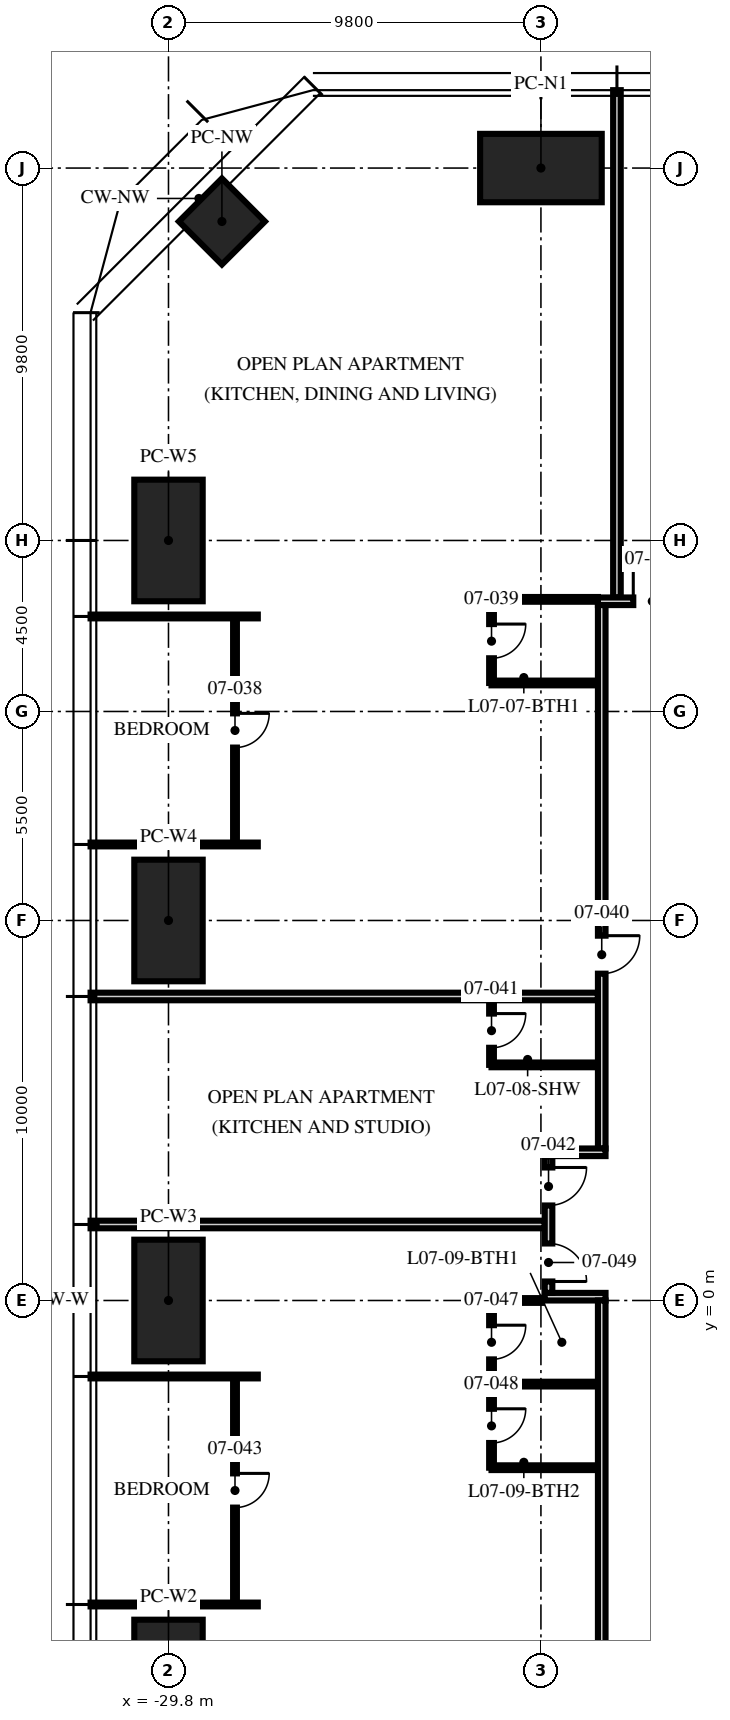
"""IFC4 building model, lengths in metres.
Left out: names, types, materials, properties, quantities, classifications, styles, units other than length and angle.
Written with IfcOpenShell. Run it as: python <this file> out.ifc"""

import sys

from ifc_helpers import new_model, si_unit, direction, frame, frame_2d, origin, origin_2d, place, context, subcontext, project, spatial, rectangle, hollow_rectangle, extrude, element, fill, save


model = new_model("IFC4")
c1 = context("Model", 3, precision=1e-05, world=origin(), true_north=direction((0.0, 1.0)))
c2 = subcontext(c1, "Body", "Model", "MODEL_VIEW")
j1 = project(units=[si_unit("LENGTHUNIT", "METRE"), si_unit("PLANEANGLEUNIT", "RADIAN")], contexts=[c1])
p1 = place(None, origin())
s1 = spatial("IfcSite", under=j1, at=p1, CompositionType="ELEMENT")
p2 = place(p1, origin())
s2 = spatial("IfcBuilding", under=s1, at=p2, CompositionType="ELEMENT")
p3 = place(p2, frame((0.0, 0.0, 32.25)))
s3 = spatial("IfcBuildingStorey", under=s2, at=p3, CompositionType="ELEMENT", Elevation=32.25)
for number, where, z_axis, x_axis in (
    (1, (-20.0, 29.8, 0.0), (0.0, 0.0, 1.0), (1.0, 0.0, 0.0)),
    (2, (-29.8, -10.0, 0.0), (0.0, 0.0, 1.0), (0.0, 1.0, 0.0)),
    (3, (-29.8, 0.0, 0.0), (0.0, 0.0, 1.0), (0.0, 1.0, 0.0)),
    (4, (-29.8, 10.0, 0.0), (0.0, 0.0, 1.0), (0.0, 1.0, 0.0)),
    (5, (-29.8, 20.0, 0.0), (0.0, 0.0, 1.0), (0.0, 1.0, 0.0)),
):
    element("IfcColumn", number, at=place(p3, frame(where, z_axis=z_axis, x_axis=x_axis)), inside=s3, PredefinedType="COLUMN", context=c2, shape_type="SweptSolid", body=[
        extrude(hollow_rectangle(XDim=3.2, YDim=1.8, WallThickness=0.2, at=origin_2d()), origin(), (0.0, 0.0, 1.0), 3.75),
    ])
p4 = place(p3, frame((-28.394, 28.394, 0.0), z_axis=(0.0, 0.0, 1.0), x_axis=(0.707106781187, 0.707106781187, 0.0)))
e6 = element("IfcColumn", 6, at=p4, inside=s3, PredefinedType="COLUMN", context=c2, shape_type="SweptSolid", body=[
    extrude(hollow_rectangle(XDim=1.6, YDim=1.6, WallThickness=0.1, at=origin_2d()), origin(), (0.0, 0.0, 1.0), 3.75),
])
p5 = place(p3, frame((-18.0, 18.5, 0.0), z_axis=(0.0, 0.0, 1.0), x_axis=(0.0, 1.0, 0.0)))
e7 = element("IfcWall", 7, at=p5, inside=s3, PredefinedType="PARTITIONING", context=c2, shape_type="SweptSolid", body=[
    extrude(rectangle(XDim=13.35, YDim=0.2, at=frame_2d((6.675, 0.0))), origin(), (0.0, 0.0, 1.0), 2.3),
])
for number, where, z_axis, x_axis in (
    (8, (-27.45, 18.0, 0.0), (0.0, 0.0, 1.0), (-1.0, 0.0, 0.0)),
    (9, (-27.45, 12.0, 0.0), (0.0, 0.0, 1.0), (-1.0, 0.0, 0.0)),
):
    element("IfcWall", number, at=place(p3, frame(where, z_axis=z_axis, x_axis=x_axis)), inside=s3, PredefinedType="PARTITIONING", context=c2, shape_type="SweptSolid", body=[
        extrude(rectangle(XDim=4.4, YDim=0.1, at=frame_2d((2.2, 0.0))), origin(), (0.0, 0.0, 1.0), 2.71),
    ])
p6 = place(p3, frame((-18.5, 8.0, 0.0), z_axis=(0.0, 0.0, 1.0), x_axis=(-1.0, 0.0, 0.0)))
e10 = element("IfcWall", 10, at=p6, inside=s3, PredefinedType="PARTITIONING", context=c2, shape_type="SweptSolid", body=[
    extrude(rectangle(XDim=13.35, YDim=0.2, at=frame_2d((6.675, 0.0))), origin(), (0.0, 0.0, 1.0), 2.71),
])
p7 = place(p3, frame((-19.9, 2.0, 0.0), z_axis=(0.0, 0.0, 1.0), x_axis=(-1.0, 0.0, 0.0)))
e11 = element("IfcWall", 11, at=p7, inside=s3, PredefinedType="PARTITIONING", context=c2, shape_type="SweptSolid", body=[
    extrude(rectangle(XDim=11.95, YDim=0.2, at=frame_2d((5.975, 0.0))), origin(), (0.0, 0.0, 1.0), 2.71),
])
for number, where, z_axis, x_axis in (
    (12, (-27.45, -2.0, 0.0), (0.0, 0.0, 1.0), (-1.0, 0.0, 0.0)),
    (13, (-27.45, -8.0, 0.0), (0.0, 0.0, 1.0), (-1.0, 0.0, 0.0)),
):
    element("IfcWall", number, at=place(p3, frame(where, z_axis=z_axis, x_axis=x_axis)), inside=s3, PredefinedType="PARTITIONING", context=c2, shape_type="SweptSolid", body=[
        extrude(rectangle(XDim=4.4, YDim=0.1, at=frame_2d((2.2, 0.0))), origin(), (0.0, 0.0, 1.0), 2.71),
    ])
p8 = place(p3, frame((-28.05, 18.0, 0.0), z_axis=(0.0, 0.0, 1.0), x_axis=(0.0, -1.0, 0.0)))
e14 = element("IfcWall", 14, at=p8, inside=s3, PredefinedType="PARTITIONING", context=c2, shape_type="SweptSolid", body=[
    extrude(rectangle(XDim=6.0, YDim=0.1, at=frame_2d((3.0, 0.0))), origin(), (0.0, 0.0, 1.0), 2.61),
])
p9 = place(p8, frame((2.55, 0.0, 0.0)))
e15 = element("IfcOpeningElement", 15, at=p9, cuts=e14, PredefinedType="OPENING", context=c2, shape_type="SweptSolid", body=[
    extrude(rectangle(XDim=0.9, YDim=2.1, at=frame_2d((0.45, 1.05))), frame((0.0, 0.06, 0.0), z_axis=(0.0, -1.0, 0.0), x_axis=(1.0, 0.0, 0.0)), (0.0, 0.0, 1.0), 0.12),
])
p10 = place(p3, frame((-21.3, 18.45, 0.0), z_axis=(0.0, 0.0, 1.0), x_axis=(0.0, -1.0, 0.0)))
e16 = element("IfcWall", 16, at=p10, inside=s3, PredefinedType="PARTITIONING", context=c2, shape_type="SweptSolid", body=[
    extrude(rectangle(XDim=2.2, YDim=0.125, at=frame_2d((1.1, 0.0))), origin(), (0.0, 0.0, 1.0), 3.5),
])
p11 = place(p10, frame((0.65, 0.0, 0.0)))
e17 = element("IfcOpeningElement", 17, at=p11, cuts=e16, PredefinedType="OPENING", context=c2, shape_type="SweptSolid", body=[
    extrude(rectangle(XDim=0.9, YDim=2.1, at=frame_2d((0.45, 1.05))), frame((0.0, 0.073, 0.0), z_axis=(0.0, -1.0, 0.0), x_axis=(1.0, 0.0, 0.0)), (0.0, 0.0, 1.0), 0.145),
])
p12 = place(p3, frame((-18.5, 18.45, 0.0), z_axis=(0.0, 0.0, 1.0), x_axis=(-1.0, 0.0, 0.0)))
e18 = element("IfcWall", 18, at=p12, inside=s3, PredefinedType="PARTITIONING", context=c2, shape_type="SweptSolid", body=[
    extrude(rectangle(XDim=2.8, YDim=0.125, at=frame_2d((1.4, 0.0))), origin(), (0.0, 0.0, 1.0), 2.3),
])
p13 = place(p3, frame((-18.5, 16.25, 0.0), z_axis=(0.0, 0.0, 1.0), x_axis=(-1.0, 0.0, 0.0)))
e19 = element("IfcWall", 19, at=p13, inside=s3, PredefinedType="PARTITIONING", context=c2, shape_type="SweptSolid", body=[
    extrude(rectangle(XDim=2.8, YDim=0.125, at=frame_2d((1.4, 0.0))), origin(), (0.0, 0.0, 1.0), 3.5),
])
p14 = place(p3, frame((-21.3, 8.0, 0.0), z_axis=(0.0, 0.0, 1.0), x_axis=(0.0, -1.0, 0.0)))
e20 = element("IfcWall", 20, at=p14, inside=s3, PredefinedType="PARTITIONING", context=c2, shape_type="SweptSolid", body=[
    extrude(rectangle(XDim=1.8, YDim=0.125, at=frame_2d((0.9, 0.0))), origin(), (0.0, 0.0, 1.0), 3.5),
])
p15 = place(p14, frame((0.45, 0.0, 0.0)))
e21 = element("IfcOpeningElement", 21, at=p15, cuts=e20, PredefinedType="OPENING", context=c2, shape_type="SweptSolid", body=[
    extrude(rectangle(XDim=0.9, YDim=2.1, at=frame_2d((0.45, 1.05))), frame((0.0, 0.073, 0.0), z_axis=(0.0, -1.0, 0.0), x_axis=(1.0, 0.0, 0.0)), (0.0, 0.0, 1.0), 0.145),
])
p16 = place(p3, frame((-18.5, 6.2, 0.0), z_axis=(0.0, 0.0, 1.0), x_axis=(-1.0, 0.0, 0.0)))
e22 = element("IfcWall", 22, at=p16, inside=s3, PredefinedType="PARTITIONING", context=c2, shape_type="SweptSolid", body=[
    extrude(rectangle(XDim=2.8, YDim=0.125, at=frame_2d((1.4, 0.0))), origin(), (0.0, 0.0, 1.0), 3.5),
])
p17 = place(p3, frame((-28.05, -2.0, 0.0), z_axis=(0.0, 0.0, 1.0), x_axis=(0.0, -1.0, 0.0)))
e23 = element("IfcWall", 23, at=p17, inside=s3, PredefinedType="PARTITIONING", context=c2, shape_type="SweptSolid", body=[
    extrude(rectangle(XDim=6.0, YDim=0.1, at=frame_2d((3.0, 0.0))), origin(), (0.0, 0.0, 1.0), 2.61),
])
p18 = place(p17, frame((2.55, 0.0, 0.0)))
e24 = element("IfcOpeningElement", 24, at=p18, cuts=e23, PredefinedType="OPENING", context=c2, shape_type="SweptSolid", body=[
    extrude(rectangle(XDim=0.9, YDim=2.1, at=frame_2d((0.45, 1.05))), frame((0.0, 0.06, 0.0), z_axis=(0.0, -1.0, 0.0), x_axis=(1.0, 0.0, 0.0)), (0.0, 0.0, 1.0), 0.12),
])
p19 = place(p3, frame((-21.3, 0.0, 0.0), z_axis=(0.0, 0.0, 1.0), x_axis=(0.0, -1.0, 0.0)))
e25 = element("IfcWall", 25, at=p19, inside=s3, PredefinedType="PARTITIONING", context=c2, shape_type="SweptSolid", body=[
    extrude(rectangle(XDim=4.4, YDim=0.125, at=frame_2d((2.2, 0.0))), origin(), (0.0, 0.0, 1.0), 2.492),
])
p20 = place(p19, frame((0.65, 0.0, 0.0)))
e26 = element("IfcOpeningElement", 26, at=p20, cuts=e25, PredefinedType="OPENING", context=c2, shape_type="SweptSolid", body=[
    extrude(rectangle(XDim=0.9, YDim=2.1, at=frame_2d((0.45, 1.05))), frame((0.0, 0.073, 0.0), z_axis=(0.0, -1.0, 0.0), x_axis=(1.0, 0.0, 0.0)), (0.0, 0.0, 1.0), 0.145),
])
p21 = place(p19, frame((2.85, 0.0, 0.0)))
e27 = element("IfcOpeningElement", 27, at=p21, cuts=e25, PredefinedType="OPENING", context=c2, shape_type="SweptSolid", body=[
    extrude(rectangle(XDim=0.9, YDim=2.1, at=frame_2d((0.45, 1.05))), frame((0.0, 0.073, 0.0), z_axis=(0.0, -1.0, 0.0), x_axis=(1.0, 0.0, 0.0)), (0.0, 0.0, 1.0), 0.145),
])
p22 = place(p3, frame((-19.97, 0.0, 0.0), z_axis=(0.0, 0.0, 1.0), x_axis=(-1.0, 0.0, 0.0)))
e28 = element("IfcWall", 28, at=p22, inside=s3, PredefinedType="PARTITIONING", context=c2, shape_type="SweptSolid", body=[
    extrude(rectangle(XDim=1.33, YDim=0.125, at=frame_2d((0.665, 0.0))), origin(), (0.0, 0.0, 1.0), 2.492),
])
for number, where, z_axis, x_axis in (
    (29, (-18.5, -2.2, 0.0), (0.0, 0.0, 1.0), (-1.0, 0.0, 0.0)),
    (30, (-18.5, -4.4, 0.0), (0.0, 0.0, 1.0), (-1.0, 0.0, 0.0)),
):
    element("IfcWall", number, at=place(p3, frame(where, z_axis=z_axis, x_axis=x_axis)), inside=s3, PredefinedType="PARTITIONING", context=c2, shape_type="SweptSolid", body=[
        extrude(rectangle(XDim=2.8, YDim=0.125, at=frame_2d((1.4, 0.0))), origin(), (0.0, 0.0, 1.0), 3.5),
    ])
p23 = place(p3, frame((-18.5, 18.4, 0.0), z_axis=(0.0, 0.0, 1.0), x_axis=(1.0, 0.0, 0.0)))
e31 = element("IfcWall", 31, at=p23, inside=s3, PredefinedType="PARTITIONING", context=c2, shape_type="SweptSolid", body=[
    extrude(rectangle(XDim=37.0, YDim=0.2, at=frame_2d((18.5, 0.0))), origin(), (0.0, 0.0, 1.0), 2.3),
])
p24 = place(p23, frame((27.1, 0.0, 0.0)))
e32 = element("IfcOpeningElement", 32, at=p24, cuts=e31, PredefinedType="OPENING", context=c2, shape_type="SweptSolid", body=[
    extrude(rectangle(XDim=1.0, YDim=2.2, at=frame_2d((0.5, 1.1))), frame((0.0, 0.11, 0.0), z_axis=(0.0, -1.0, 0.0), x_axis=(1.0, 0.0, 0.0)), (0.0, 0.0, 1.0), 0.22),
])
p25 = place(p23, frame((11.23, 0.0, 0.0)))
e33 = element("IfcOpeningElement", 33, at=p25, cuts=e31, PredefinedType="OPENING", context=c2, shape_type="SweptSolid", body=[
    extrude(rectangle(XDim=1.0, YDim=2.2, at=frame_2d((0.5, 1.1))), frame((0.0, 0.11, 0.0), z_axis=(0.0, -1.0, 0.0), x_axis=(1.0, 0.0, 0.0)), (0.0, 0.0, 1.0), 0.22),
])
p26 = place(p23, frame((6.93, 0.0, 0.0)))
e34 = element("IfcOpeningElement", 34, at=p26, cuts=e31, PredefinedType="OPENING", context=c2, shape_type="SweptSolid", body=[
    extrude(rectangle(XDim=1.0, YDim=2.2, at=frame_2d((0.5, 1.1))), frame((0.0, 0.11, 0.0), z_axis=(0.0, -1.0, 0.0), x_axis=(1.0, 0.0, 0.0)), (0.0, 0.0, 1.0), 0.22),
])
p27 = place(p23, frame((0.93, 0.0, 0.0)))
e35 = element("IfcOpeningElement", 35, at=p27, cuts=e31, PredefinedType="OPENING", context=c2, shape_type="SweptSolid", body=[
    extrude(rectangle(XDim=1.0, YDim=2.2, at=frame_2d((0.5, 1.1))), frame((0.0, 0.11, 0.0), z_axis=(0.0, -1.0, 0.0), x_axis=(1.0, 0.0, 0.0)), (0.0, 0.0, 1.0), 0.22),
])
p28 = place(p3, frame((-18.4, 18.3, 0.0), z_axis=(0.0, 0.0, 1.0), x_axis=(0.0, -1.0, 0.0)))
e36 = element("IfcWall", 36, at=p28, inside=s3, PredefinedType="PARTITIONING", context=c2, shape_type="SweptSolid", body=[
    extrude(rectangle(XDim=14.3, YDim=0.2, at=frame_2d((7.15, 0.0))), origin(), (0.0, 0.0, 1.0), 2.3),
])
p29 = place(p28, frame((8.7, 0.0, 0.0)))
e37 = element("IfcOpeningElement", 37, at=p29, cuts=e36, PredefinedType="OPENING", context=c2, shape_type="SweptSolid", body=[
    extrude(rectangle(XDim=1.0, YDim=2.2, at=frame_2d((0.5, 1.1))), frame((0.0, 0.11, 0.0), z_axis=(0.0, -1.0, 0.0), x_axis=(1.0, 0.0, 0.0)), (0.0, 0.0, 1.0), 0.22),
])
p30 = place(p3, frame((-18.3, 3.9, 0.0), z_axis=(0.0, 0.0, 1.0), x_axis=(-1.0, 0.0, 0.0)))
e38 = element("IfcWall", 38, at=p30, inside=s3, PredefinedType="PARTITIONING", context=c2, shape_type="SweptSolid", body=[
    extrude(rectangle(XDim=1.6, YDim=0.2, at=frame_2d((0.8, 0.0))), origin(), (0.0, 0.0, 1.0), 3.5),
])
p31 = place(p3, frame((-18.3, 0.1, 0.0), z_axis=(0.0, 0.0, 1.0), x_axis=(-1.0, 0.0, 0.0)))
e39 = element("IfcWall", 39, at=p31, inside=s3, PredefinedType="PARTITIONING", context=c2, shape_type="SweptSolid", body=[
    extrude(rectangle(XDim=1.6, YDim=0.2, at=frame_2d((0.8, 0.0))), origin(), (0.0, 0.0, 1.0), 2.492),
])
p32 = place(p3, frame((-19.8, 3.8, 0.0), z_axis=(0.0, 0.0, 1.0), x_axis=(0.0, -1.0, 0.0)))
e40 = element("IfcWall", 40, at=p32, inside=s3, PredefinedType="PARTITIONING", context=c2, shape_type="SweptSolid", body=[
    extrude(rectangle(XDim=3.6, YDim=0.2, at=frame_2d((1.8, 0.0))), origin(), (0.0, 0.0, 1.0), 3.5),
])
p33 = place(p32, frame((0.3, 0.0, 0.0)))
e41 = element("IfcOpeningElement", 41, at=p33, cuts=e40, PredefinedType="OPENING", context=c2, shape_type="SweptSolid", body=[
    extrude(rectangle(XDim=1.0, YDim=2.2, at=frame_2d((0.5, 1.1))), frame((0.0, 0.11, 0.0), z_axis=(0.0, -1.0, 0.0), x_axis=(1.0, 0.0, 0.0)), (0.0, 0.0, 1.0), 0.22),
])
p34 = place(p32, frame((2.3, 0.0, 0.0)))
e42 = element("IfcOpeningElement", 42, at=p34, cuts=e40, PredefinedType="OPENING", context=c2, shape_type="SweptSolid", body=[
    extrude(rectangle(XDim=1.0, YDim=2.2, at=frame_2d((0.5, 1.1))), frame((0.0, 0.11, 0.0), z_axis=(0.0, -1.0, 0.0), x_axis=(1.0, 0.0, 0.0)), (0.0, 0.0, 1.0), 0.22),
])
p35 = place(p3, frame((-18.4, 0.0, 0.0), z_axis=(0.0, 0.0, 1.0), x_axis=(0.0, -1.0, 0.0)))
e43 = element("IfcWall", 43, at=p35, inside=s3, PredefinedType="PARTITIONING", context=c2, shape_type="SweptSolid", body=[
    extrude(rectangle(XDim=18.3, YDim=0.2, at=frame_2d((9.15, 0.0))), origin(), (0.0, 0.0, 1.0), 2.3),
])
p36 = place(p27, origin())
e44 = element("IfcDoor", 44, at=p36, inside=s3, OperationType="SINGLE_SWING_LEFT", PredefinedType="DOOR", context=c2, shape_type="SweptSolid", body=[
    extrude(rectangle(XDim=1.0, YDim=2.2, at=frame_2d((0.5, 1.1))), frame((0.0, 0.025, 0.0), z_axis=(0.0, -1.0, 0.0), x_axis=(1.0, 0.0, 0.0)), (0.0, 0.0, 1.0), 0.05),
])
fill(e35, e44)
p37 = place(p9, origin())
e45 = element("IfcDoor", 45, at=p37, inside=s3, OperationType="SINGLE_SWING_LEFT", PredefinedType="DOOR", context=c2, shape_type="SweptSolid", body=[
    extrude(rectangle(XDim=0.9, YDim=2.1, at=frame_2d((0.45, 1.05))), frame((0.0, 0.025, 0.0), z_axis=(0.0, -1.0, 0.0), x_axis=(1.0, 0.0, 0.0)), (0.0, 0.0, 1.0), 0.05),
])
fill(e15, e45)
p38 = place(p11, origin())
e46 = element("IfcDoor", 46, at=p38, inside=s3, OperationType="SINGLE_SWING_LEFT", PredefinedType="DOOR", context=c2, shape_type="SweptSolid", body=[
    extrude(rectangle(XDim=0.9, YDim=2.1, at=frame_2d((0.45, 1.05))), frame((0.0, 0.025, 0.0), z_axis=(0.0, -1.0, 0.0), x_axis=(1.0, 0.0, 0.0)), (0.0, 0.0, 1.0), 0.05),
])
fill(e17, e46)
p39 = place(p29, origin())
e47 = element("IfcDoor", 47, at=p39, inside=s3, OperationType="SINGLE_SWING_LEFT", PredefinedType="DOOR", context=c2, shape_type="SweptSolid", body=[
    extrude(rectangle(XDim=1.0, YDim=2.2, at=frame_2d((0.5, 1.1))), frame((0.0, 0.025, 0.0), z_axis=(0.0, -1.0, 0.0), x_axis=(1.0, 0.0, 0.0)), (0.0, 0.0, 1.0), 0.05),
])
fill(e37, e47)
p40 = place(p15, origin())
e48 = element("IfcDoor", 48, at=p40, inside=s3, OperationType="SINGLE_SWING_LEFT", PredefinedType="DOOR", context=c2, shape_type="SweptSolid", body=[
    extrude(rectangle(XDim=0.9, YDim=2.1, at=frame_2d((0.45, 1.05))), frame((0.0, 0.025, 0.0), z_axis=(0.0, -1.0, 0.0), x_axis=(1.0, 0.0, 0.0)), (0.0, 0.0, 1.0), 0.05),
])
fill(e21, e48)
p41 = place(p33, origin())
e49 = element("IfcDoor", 49, at=p41, inside=s3, OperationType="SINGLE_SWING_LEFT", PredefinedType="DOOR", context=c2, shape_type="SweptSolid", body=[
    extrude(rectangle(XDim=1.0, YDim=2.2, at=frame_2d((0.5, 1.1))), frame((0.0, 0.025, 0.0), z_axis=(0.0, -1.0, 0.0), x_axis=(1.0, 0.0, 0.0)), (0.0, 0.0, 1.0), 0.05),
])
fill(e41, e49)
p42 = place(p18, origin())
e50 = element("IfcDoor", 50, at=p42, inside=s3, OperationType="SINGLE_SWING_LEFT", PredefinedType="DOOR", context=c2, shape_type="SweptSolid", body=[
    extrude(rectangle(XDim=0.9, YDim=2.1, at=frame_2d((0.45, 1.05))), frame((0.0, 0.025, 0.0), z_axis=(0.0, -1.0, 0.0), x_axis=(1.0, 0.0, 0.0)), (0.0, 0.0, 1.0), 0.05),
])
fill(e24, e50)
p43 = place(p20, origin())
e51 = element("IfcDoor", 51, at=p43, inside=s3, OperationType="SINGLE_SWING_LEFT", PredefinedType="DOOR", context=c2, shape_type="SweptSolid", body=[
    extrude(rectangle(XDim=0.9, YDim=2.1, at=frame_2d((0.45, 1.05))), frame((0.0, 0.025, 0.0), z_axis=(0.0, -1.0, 0.0), x_axis=(1.0, 0.0, 0.0)), (0.0, 0.0, 1.0), 0.05),
])
fill(e26, e51)
p44 = place(p21, origin())
e52 = element("IfcDoor", 52, at=p44, inside=s3, OperationType="SINGLE_SWING_LEFT", PredefinedType="DOOR", context=c2, shape_type="SweptSolid", body=[
    extrude(rectangle(XDim=0.9, YDim=2.1, at=frame_2d((0.45, 1.05))), frame((0.0, 0.025, 0.0), z_axis=(0.0, -1.0, 0.0), x_axis=(1.0, 0.0, 0.0)), (0.0, 0.0, 1.0), 0.05),
])
fill(e27, e52)
p45 = place(p34, origin())
e53 = element("IfcDoor", 53, at=p45, inside=s3, OperationType="SINGLE_SWING_RIGHT", PredefinedType="DOOR", context=c2, shape_type="SweptSolid", body=[
    extrude(rectangle(XDim=1.0, YDim=2.2, at=frame_2d((0.5, 1.1))), frame((0.0, 0.025, 0.0), z_axis=(0.0, -1.0, 0.0), x_axis=(1.0, 0.0, 0.0)), (0.0, 0.0, 1.0), 0.05),
])
fill(e42, e53)
save(model, sys.argv[1])
